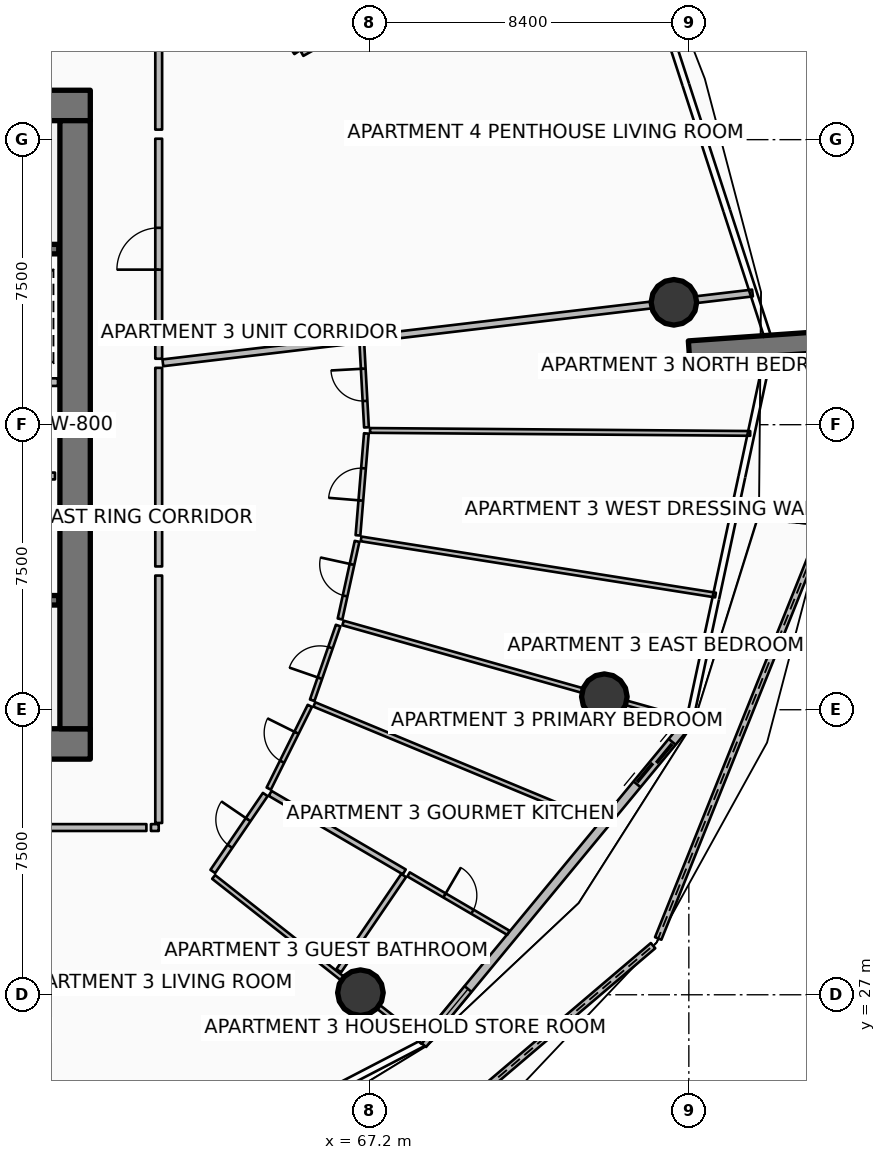
"""IFC4 building model, lengths in metres.
Left out: names, types, materials, properties, quantities, classifications, styles, units other than length and angle.
Written with IfcOpenShell. Run it as: python <this file> out.ifc"""

import sys

from ifc_helpers import new_model, si_unit, direction, frame, frame_2d, origin, origin_2d, place, context, subcontext, project, spatial, polyline, rectangle, circle, outline, extrude, element, fill, save


model = new_model("IFC4")
c1 = context("Model", 3, precision=1e-05, world=origin(), true_north=direction((0.0, 1.0)))
c2 = subcontext(c1, "Body", "Model", "MODEL_VIEW")
j1 = project(units=[si_unit("LENGTHUNIT", "METRE"), si_unit("PLANEANGLEUNIT", "RADIAN")], contexts=[c1])
p1 = place(None, origin())
s1 = spatial("IfcSite", under=j1, at=p1, CompositionType="ELEMENT")
p2 = place(p1, origin())
s2 = spatial("IfcBuilding", under=s1, at=p2, CompositionType="ELEMENT")
p3 = place(p2, frame((0.0, 0.0, 97.65)))
s3 = spatial("IfcBuildingStorey", under=s2, at=p3, CompositionType="ELEMENT", Elevation=97.65)
for number, where, z_axis, x_axis in (
    (1, (49.95, 33.6, 0.0), (0.0, 0.0, 1.0), (1.0, 0.0, 0.0)),
    (2, (49.95, 50.4, 0.0), (0.0, 0.0, 1.0), (1.0, 0.0, 0.0)),
):
    element("IfcWall", number, at=place(p3, frame(where, z_axis=z_axis, x_axis=x_axis)), inside=s3, PredefinedType="SHEAR", context=c2, shape_type="SweptSolid", body=[
        extrude(rectangle(XDim=9.9, YDim=0.8, at=frame_2d((4.95, 0.0))), origin(), (0.0, 0.0, 1.0), 3.75),
    ])
p4 = place(p3, frame((59.45, 34.0, 0.0), z_axis=(0.0, 0.0, 1.0), x_axis=(0.0, 1.0, 0.0)))
e3 = element("IfcWall", 3, at=p4, inside=s3, PredefinedType="SHEAR", context=c2, shape_type="SweptSolid", body=[
    extrude(rectangle(XDim=16.0, YDim=0.8, at=frame_2d((8.0, 0.0))), origin(), (0.0, 0.0, 1.0), 3.75),
])
p5 = place(p3, frame((75.606, 43.93, 0.0), z_axis=(0.0, 0.0, 1.0), x_axis=(0.997564163539, 0.069754853754, 0.0)))
e4 = element("IfcWall", 4, at=p5, inside=s3, PredefinedType="SOLIDWALL", context=c2, shape_type="SweptSolid", body=[
    extrude(rectangle(XDim=3.5, YDim=0.55, at=frame_2d((1.75, 0.0))), origin(), (0.0, 0.0, 1.0), 3.75),
])
for number, where, z_axis, x_axis in (
    (5, (66.958, 27.055, 0.0), (0.0, 0.0, 1.0), (1.0, 0.0, 0.0)),
    (6, (73.377, 34.843, 0.0), (0.0, 0.0, 1.0), (1.0, 0.0, 0.0)),
    (7, (75.207, 45.22, 0.0), (0.0, 0.0, 1.0), (1.0, 0.0, 0.0)),
):
    element("IfcColumn", number, at=place(p3, frame(where, z_axis=z_axis, x_axis=x_axis)), inside=s3, PredefinedType="COLUMN", context=c2, shape_type="SweptSolid", body=[
        extrude(circle(Radius=0.6, at=origin_2d()), origin(), (0.0, 0.0, 1.0), 3.5),
    ])
p6 = place(p3, frame((66.126, 21.038, 0.0), z_axis=(0.0, 0.0, 1.0), x_axis=(0.761849488871, 0.647754086291, 0.0)))
e8 = element("IfcWall", 8, at=p6, inside=s3, PredefinedType="PARAPET", context=c2, shape_type="SweptSolid", body=[
    extrude(outline(polyline([(0.0, 0.0), (11.2, 0.0), (11.2, 1.632), (5.6, 1.798), (0.0, 1.86), (0.0, 0.0)])), frame((0.0, 0.09, 0.0), z_axis=(0.0, -1.0, 0.0), x_axis=(1.0, 0.0, 0.0)), (0.0, 0.0, 1.0), 0.18),
])
p7 = place(p3, frame((74.794, 28.482, 0.0), z_axis=(0.0, 0.0, 1.0), x_axis=(0.372543477275, 0.928014739937, 0.0)))
e9 = element("IfcWall", 9, at=p7, inside=s3, PredefinedType="PARAPET", context=c2, shape_type="SweptSolid", body=[
    extrude(outline(polyline([(0.0, 0.0), (11.718, 0.0), (11.718, 1.233), (5.859, 1.418), (0.0, 1.632), (0.0, 0.0)])), frame((0.0, 0.09, 0.0), z_axis=(0.0, -1.0, 0.0), x_axis=(1.0, 0.0, 0.0)), (0.0, 0.0, 1.0), 0.18),
])
p8 = place(p3, frame((68.593, 25.702, 0.0), z_axis=(0.0, 0.0, 1.0), x_axis=(0.636704975, 0.771107498868, 0.0)))
e10 = element("IfcWall", 10, at=p8, inside=s3, PredefinedType="SOLIDWALL", context=c2, shape_type="SweptSolid", body=[
    extrude(rectangle(XDim=11.084, YDim=0.24, at=frame_2d((5.542, 0.0))), origin(), (0.0, 0.0, 1.0), 2.45),
])
p9 = place(p8, frame((8.864, 0.0, 0.0)))
e11 = element("IfcOpeningElement", 11, at=p9, cuts=e10, PredefinedType="OPENING", context=c2, shape_type="SweptSolid", body=[
    extrude(rectangle(XDim=1.45, YDim=2.15, at=frame_2d((0.725, 1.075))), frame((0.0, 0.13, 0.0), z_axis=(0.0, -1.0, 0.0), x_axis=(1.0, 0.0, 0.0)), (0.0, 0.0, 1.0), 0.26),
])
p10 = place(p8, frame((0.28, 0.0, 0.65)))
e12 = element("IfcOpeningElement", 12, at=p10, cuts=e10, PredefinedType="OPENING", context=c2, shape_type="SweptSolid", body=[
    extrude(rectangle(XDim=1.6, YDim=1.5, at=frame_2d((0.8, 0.75))), frame((0.0, 0.13, 0.0), z_axis=(0.0, -1.0, 0.0), x_axis=(1.0, 0.0, 0.0)), (0.0, 0.0, 1.0), 0.26),
])
p11 = place(p3, frame((51.48, 46.62, 0.0), z_axis=(0.0, 0.0, 1.0), x_axis=(1.0, 0.0, 0.0)))
e13 = element("IfcWall", 13, at=p11, inside=s3, PredefinedType="SOLIDWALL", context=c2, shape_type="SweptSolid", body=[
    extrude(rectangle(XDim=7.54, YDim=0.25, at=frame_2d((3.77, 0.0))), origin(), (0.0, 0.0, 1.0), 3.5),
])
p12 = place(p11, frame((0.3, 0.0, 0.0)))
e14 = element("IfcOpeningElement", 14, at=p12, cuts=e13, PredefinedType="OPENING", context=c2, shape_type="SweptSolid", body=[
    extrude(rectangle(XDim=1.55, YDim=2.15, at=frame_2d((0.775, 1.075))), frame((0.0, 0.135, 0.0), z_axis=(0.0, -1.0, 0.0), x_axis=(1.0, 0.0, 0.0)), (0.0, 0.0, 1.0), 0.27),
])
p13 = place(p3, frame((51.48, 37.38, 0.0), z_axis=(0.0, 0.0, 1.0), x_axis=(1.0, 0.0, 0.0)))
e15 = element("IfcWall", 15, at=p13, inside=s3, PredefinedType="SOLIDWALL", context=c2, shape_type="SweptSolid", body=[
    extrude(rectangle(XDim=7.54, YDim=0.25, at=frame_2d((3.77, 0.0))), origin(), (0.0, 0.0, 1.0), 3.5),
])
p14 = place(p13, frame((0.3, 0.0, 0.0)))
e16 = element("IfcOpeningElement", 16, at=p14, cuts=e15, PredefinedType="OPENING", context=c2, shape_type="SweptSolid", body=[
    extrude(rectangle(XDim=1.55, YDim=2.15, at=frame_2d((0.775, 1.075))), frame((0.0, 0.135, 0.0), z_axis=(0.0, -1.0, 0.0), x_axis=(1.0, 0.0, 0.0)), (0.0, 0.0, 1.0), 0.27),
])
p15 = place(p3, frame((52.42, 40.65, 0.0), z_axis=(0.0, 0.0, 1.0), x_axis=(1.0, 0.0, 0.0)))
e17 = element("IfcWall", 17, at=p15, inside=s3, PredefinedType="PARTITIONING", context=c2, shape_type="SweptSolid", body=[
    extrude(rectangle(XDim=6.5, YDim=0.18, at=frame_2d((3.25, 0.0))), origin(), (0.0, 0.0, 1.0), 3.5),
])
p16 = place(p15, frame((2.825, 0.0, 0.0)))
e18 = element("IfcOpeningElement", 18, at=p16, cuts=e17, PredefinedType="OPENING", context=c2, shape_type="SweptSolid", body=[
    extrude(rectangle(XDim=0.85, YDim=2.06, at=frame_2d((0.425, 1.03))), frame((0.0, 0.1, 0.0), z_axis=(0.0, -1.0, 0.0), x_axis=(1.0, 0.0, 0.0)), (0.0, 0.0, 1.0), 0.2),
])
p17 = place(p3, frame((50.12, 43.12, 0.0), z_axis=(0.0, 0.0, 1.0), x_axis=(1.0, 0.0, 0.0)))
e19 = element("IfcWall", 19, at=p17, inside=s3, PredefinedType="PARTITIONING", context=c2, shape_type="SweptSolid", body=[
    extrude(rectangle(XDim=8.88, YDim=0.2, at=frame_2d((4.44, 0.0))), origin(), (0.0, 0.0, 1.0), 3.5),
])
p18 = place(p3, frame((53.99, 31.304, 0.0), z_axis=(0.0, 0.0, 1.0), x_axis=(0.488628442553, -0.872491974249, 0.0)))
e20 = element("IfcWall", 20, at=p18, inside=s3, PredefinedType="PARTITIONING", context=c2, shape_type="SweptSolid", body=[
    extrude(rectangle(XDim=11.563, YDim=0.18, at=frame_2d((5.782, 0.0))), origin(), (0.0, 0.0, 1.0), 2.94),
])
p19 = place(p3, frame((61.759, 43.628, 0.0), z_axis=(0.0, 0.0, 1.0), x_axis=(0.99306822875, 0.117539325539, 0.0)))
e21 = element("IfcWall", 21, at=p19, inside=s3, PredefinedType="PARTITIONING", context=c2, shape_type="SweptSolid", body=[
    extrude(rectangle(XDim=15.624, YDim=0.18, at=frame_2d((7.812, 0.0))), origin(), (0.0, 0.0, 1.0), 2.94),
])
p20 = place(p3, frame((54.056, 31.4, 0.0), z_axis=(0.0, 0.0, 1.0), x_axis=(1.0, 0.0, 0.0)))
e22 = element("IfcWall", 22, at=p20, inside=s3, PredefinedType="PARTITIONING", context=c2, shape_type="SweptSolid", body=[
    extrude(rectangle(XDim=7.27, YDim=0.18, at=frame_2d((3.635, 0.0))), origin(), (0.0, 0.0, 1.0), 2.94),
])
p21 = place(p20, frame((3.085, 0.0, 0.0)))
e23 = element("IfcOpeningElement", 23, at=p21, cuts=e22, PredefinedType="OPENING", context=c2, shape_type="SweptSolid", body=[
    extrude(rectangle(XDim=1.1, YDim=2.1, at=frame_2d((0.55, 1.05))), frame((0.0, 0.1, 0.0), z_axis=(0.0, -1.0, 0.0), x_axis=(1.0, 0.0, 0.0)), (0.0, 0.0, 1.0), 0.2),
])
p22 = place(p3, frame((61.446, 31.4, 0.0), z_axis=(0.0, 0.0, 1.0), x_axis=(1.0, 0.0, 0.0)))
e24 = element("IfcWall", 24, at=p22, inside=s3, PredefinedType="PARTITIONING", context=c2, shape_type="SweptSolid", body=[
    extrude(rectangle(XDim=0.204, YDim=0.18, at=frame_2d((0.102, 0.0))), origin(), (0.0, 0.0, 1.0), 2.94),
])
p23 = place(p3, frame((61.65, 31.52, 0.0), z_axis=(0.0, 0.0, 1.0), x_axis=(0.0, 1.0, 0.0)))
e25 = element("IfcWall", 25, at=p23, inside=s3, PredefinedType="PARTITIONING", context=c2, shape_type="SweptSolid", body=[
    extrude(rectangle(XDim=6.51, YDim=0.18, at=frame_2d((3.255, 0.0))), origin(), (0.0, 0.0, 1.0), 2.94),
])
p24 = place(p3, frame((63.095, 30.1, 0.0), z_axis=(0.0, 0.0, 1.0), x_axis=(0.78530300145, -0.6191116183, 0.0)))
e26 = element("IfcWall", 26, at=p24, inside=s3, PredefinedType="PARTITIONING", context=c2, shape_type="SweptSolid", body=[
    extrude(rectangle(XDim=7.016, YDim=0.125, at=frame_2d((3.508, 0.0))), origin(), (0.0, 0.0, 1.0), 2.94),
])
p25 = place(p3, frame((63.073, 30.244, 0.0), z_axis=(0.0, 0.0, 1.0), x_axis=(0.563472809808, 0.826134609254, 0.0)))
e27 = element("IfcWall", 27, at=p25, inside=s3, PredefinedType="PARTITIONING", context=c2, shape_type="SweptSolid", body=[
    extrude(rectangle(XDim=2.451, YDim=0.15, at=frame_2d((1.226, 0.0))), origin(), (0.0, 0.0, 1.0), 2.94),
])
p26 = place(p25, frame((0.801, 0.0, 0.0)))
e28 = element("IfcOpeningElement", 28, at=p26, cuts=e27, PredefinedType="OPENING", context=c2, shape_type="SweptSolid", body=[
    extrude(rectangle(XDim=0.85, YDim=2.06, at=frame_2d((0.425, 1.03))), frame((0.0, 0.085, 0.0), z_axis=(0.0, -1.0, 0.0), x_axis=(1.0, 0.0, 0.0)), (0.0, 0.0, 1.0), 0.17),
])
p27 = place(p3, frame((66.387, 27.632, 0.0), z_axis=(0.0, 0.0, 1.0), x_axis=(0.563341818284, 0.826223938029, 0.0)))
e29 = element("IfcWall", 29, at=p27, inside=s3, PredefinedType="PARTITIONING", context=c2, shape_type="SweptSolid", body=[
    extrude(rectangle(XDim=3.034, YDim=0.15, at=frame_2d((1.517, 0.0))), origin(), (0.0, 0.0, 1.0), 2.94),
])
p28 = place(p3, frame((64.583, 32.298, 0.0), z_axis=(0.0, 0.0, 1.0), x_axis=(0.863128698129, -0.504984010109, 0.0)))
e30 = element("IfcWall", 30, at=p28, inside=s3, PredefinedType="PARTITIONING", context=c2, shape_type="SweptSolid", body=[
    extrude(rectangle(XDim=4.09, YDim=0.15, at=frame_2d((2.045, 0.0))), origin(), (0.0, 0.0, 1.0), 2.94),
])
p29 = place(p3, frame((68.225, 30.167, 0.0), z_axis=(0.0, 0.0, 1.0), x_axis=(0.863132180625, -0.504978057711, 0.0)))
e31 = element("IfcWall", 31, at=p29, inside=s3, PredefinedType="PARTITIONING", context=c2, shape_type="SweptSolid", body=[
    extrude(rectangle(XDim=3.043, YDim=0.125, at=frame_2d((1.521, 0.0))), origin(), (0.0, 0.0, 1.0), 2.94),
])
p30 = place(p29, frame((1.096, 0.0, 0.0)))
e32 = element("IfcOpeningElement", 32, at=p30, cuts=e31, PredefinedType="OPENING", context=c2, shape_type="SweptSolid", body=[
    extrude(rectangle(XDim=0.85, YDim=2.06, at=frame_2d((0.425, 1.03))), frame((0.0, 0.073, 0.0), z_axis=(0.0, -1.0, 0.0), x_axis=(1.0, 0.0, 0.0)), (0.0, 0.0, 1.0), 0.145),
])
p31 = place(p3, frame((65.746, 34.639, 0.0), z_axis=(0.0, 0.0, 1.0), x_axis=(0.923687629783, -0.383146398373, 0.0)))
e33 = element("IfcWall", 33, at=p31, inside=s3, PredefinedType="PARTITIONING", context=c2, shape_type="SweptSolid", body=[
    extrude(rectangle(XDim=8.122, YDim=0.125, at=frame_2d((4.061, 0.0))), origin(), (0.0, 0.0, 1.0), 2.94),
])
p32 = place(p3, frame((64.545, 32.424, 0.0), z_axis=(0.0, 0.0, 1.0), x_axis=(0.445043296976, 0.895509052895, 0.0)))
e34 = element("IfcWall", 34, at=p32, inside=s3, PredefinedType="PARTITIONING", context=c2, shape_type="SweptSolid", body=[
    extrude(rectangle(XDim=2.431, YDim=0.125, at=frame_2d((1.216, 0.0))), origin(), (0.0, 0.0, 1.0), 2.94),
])
p33 = place(p32, frame((0.791, 0.0, 0.0)))
e35 = element("IfcOpeningElement", 35, at=p33, cuts=e34, PredefinedType="OPENING", context=c2, shape_type="SweptSolid", body=[
    extrude(rectangle(XDim=0.85, YDim=2.06, at=frame_2d((0.425, 1.03))), frame((0.0, 0.073, 0.0), z_axis=(0.0, -1.0, 0.0), x_axis=(1.0, 0.0, 0.0)), (0.0, 0.0, 1.0), 0.145),
])
p34 = place(p3, frame((65.689, 34.749, 0.0), z_axis=(0.0, 0.0, 1.0), x_axis=(0.327956443315, 0.944692844944, 0.0)))
e36 = element("IfcWall", 36, at=p34, inside=s3, PredefinedType="PARTITIONING", context=c2, shape_type="SweptSolid", body=[
    extrude(rectangle(XDim=2.082, YDim=0.125, at=frame_2d((1.041, 0.0))), origin(), (0.0, 0.0, 1.0), 2.94),
])
p35 = place(p34, frame((0.615, 0.0, 0.0)))
e37 = element("IfcOpeningElement", 37, at=p35, cuts=e36, PredefinedType="OPENING", context=c2, shape_type="SweptSolid", body=[
    extrude(rectangle(XDim=0.85, YDim=2.06, at=frame_2d((0.425, 1.03))), frame((0.0, 0.073, 0.0), z_axis=(0.0, -1.0, 0.0), x_axis=(1.0, 0.0, 0.0)), (0.0, 0.0, 1.0), 0.145),
])
p36 = place(p3, frame((61.65, 38.27, 0.0), z_axis=(0.0, 0.0, 1.0), x_axis=(0.0, 1.0, 0.0)))
e38 = element("IfcWall", 38, at=p36, inside=s3, PredefinedType="PARTITIONING", context=c2, shape_type="SweptSolid", body=[
    extrude(rectangle(XDim=5.225, YDim=0.18, at=frame_2d((2.613, 0.0))), origin(), (0.0, 0.0, 1.0), 2.94),
])
p37 = place(p3, frame((66.5, 36.782, 0.0), z_axis=(0.0, 0.0, 1.0), x_axis=(0.962451600307, -0.271453342338, 0.0)))
e39 = element("IfcWall", 39, at=p37, inside=s3, PredefinedType="PARTITIONING", context=c2, shape_type="SweptSolid", body=[
    extrude(rectangle(XDim=9.349, YDim=0.125, at=frame_2d((4.675, 0.0))), origin(), (0.0, 0.0, 1.0), 2.94),
])
p38 = place(p3, frame((66.976, 38.995, 0.0), z_axis=(0.0, 0.0, 1.0), x_axis=(0.987686752204, -0.156444493419, 0.0)))
e40 = element("IfcWall", 40, at=p38, inside=s3, PredefinedType="PARTITIONING", context=c2, shape_type="SweptSolid", body=[
    extrude(rectangle(XDim=9.443, YDim=0.125, at=frame_2d((4.721, 0.0))), origin(), (0.0, 0.0, 1.0), 2.94),
])
p39 = place(p3, frame((67.211, 41.849, 0.0), z_axis=(0.0, 0.0, 1.0), x_axis=(0.999969120795, -0.007858591192, 0.0)))
e41 = element("IfcWall", 41, at=p39, inside=s3, PredefinedType="PARTITIONING", context=c2, shape_type="SweptSolid", body=[
    extrude(rectangle(XDim=10.003, YDim=0.125, at=frame_2d((5.002, 0.0))), origin(), (0.0, 0.0, 1.0), 2.94),
])
p40 = place(p3, frame((66.421, 36.888, 0.0), z_axis=(0.0, 0.0, 1.0), x_axis=(0.21430951395, 0.97676580214, 0.0)))
e42 = element("IfcWall", 42, at=p40, inside=s3, PredefinedType="PARTITIONING", context=c2, shape_type="SweptSolid", body=[
    extrude(rectangle(XDim=2.092, YDim=0.125, at=frame_2d((1.046, 0.0))), origin(), (0.0, 0.0, 1.0), 2.94),
])
p41 = place(p40, frame((0.621, 0.0, 0.0)))
e43 = element("IfcOpeningElement", 43, at=p41, cuts=e42, PredefinedType="OPENING", context=c2, shape_type="SweptSolid", body=[
    extrude(rectangle(XDim=0.85, YDim=2.06, at=frame_2d((0.425, 1.03))), frame((0.0, 0.073, 0.0), z_axis=(0.0, -1.0, 0.0), x_axis=(1.0, 0.0, 0.0)), (0.0, 0.0, 1.0), 0.145),
])
p42 = place(p3, frame((66.893, 39.088, 0.0), z_axis=(0.0, 0.0, 1.0), x_axis=(0.082294564914, 0.996608049629, 0.0)))
e44 = element("IfcWall", 44, at=p42, inside=s3, PredefinedType="PARTITIONING", context=c2, shape_type="SweptSolid", body=[
    extrude(rectangle(XDim=2.691, YDim=0.125, at=frame_2d((1.345, 0.0))), origin(), (0.0, 0.0, 1.0), 2.94),
])
p43 = place(p42, frame((0.92, 0.0, 0.0)))
e45 = element("IfcOpeningElement", 45, at=p43, cuts=e44, PredefinedType="OPENING", context=c2, shape_type="SweptSolid", body=[
    extrude(rectangle(XDim=0.85, YDim=2.06, at=frame_2d((0.425, 1.03))), frame((0.0, 0.073, 0.0), z_axis=(0.0, -1.0, 0.0), x_axis=(1.0, 0.0, 0.0)), (0.0, 0.0, 1.0), 0.145),
])
p44 = place(p3, frame((67.117, 41.93, 0.0), z_axis=(0.0, 0.0, 1.0), x_axis=(-0.054896910866, 0.998492027598, 0.0)))
e46 = element("IfcWall", 46, at=p44, inside=s3, PredefinedType="PARTITIONING", context=c2, shape_type="SweptSolid", body=[
    extrude(rectangle(XDim=2.241, YDim=0.125, at=frame_2d((1.121, 0.0))), origin(), (0.0, 0.0, 1.0), 2.94),
])
p45 = place(p44, frame((0.696, 0.0, 0.0)))
e47 = element("IfcOpeningElement", 47, at=p45, cuts=e46, PredefinedType="OPENING", context=c2, shape_type="SweptSolid", body=[
    extrude(rectangle(XDim=0.85, YDim=2.06, at=frame_2d((0.425, 1.03))), frame((0.0, 0.073, 0.0), z_axis=(0.0, -1.0, 0.0), x_axis=(1.0, 0.0, 0.0)), (0.0, 0.0, 1.0), 0.145),
])
p46 = place(p3, frame((61.65, 43.736, 0.0), z_axis=(0.0, 0.0, 1.0), x_axis=(0.0, 1.0, 0.0)))
e48 = element("IfcWall", 48, at=p46, inside=s3, PredefinedType="PARTITIONING", context=c2, shape_type="SweptSolid", body=[
    extrude(rectangle(XDim=5.789, YDim=0.18, at=frame_2d((2.895, 0.0))), origin(), (0.0, 0.0, 1.0), 2.94),
])
p47 = place(p46, frame((2.344, 0.0, 0.0)))
e49 = element("IfcOpeningElement", 49, at=p47, cuts=e48, PredefinedType="OPENING", context=c2, shape_type="SweptSolid", body=[
    extrude(rectangle(XDim=1.1, YDim=2.1, at=frame_2d((0.55, 1.05))), frame((0.0, 0.1, 0.0), z_axis=(0.0, -1.0, 0.0), x_axis=(1.0, 0.0, 0.0)), (0.0, 0.0, 1.0), 0.2),
])
p48 = place(p3, frame((61.65, 49.764, 0.0), z_axis=(0.0, 0.0, 1.0), x_axis=(0.0, 1.0, 0.0)))
e50 = element("IfcWall", 50, at=p48, inside=s3, PredefinedType="PARTITIONING", context=c2, shape_type="SweptSolid", body=[
    extrude(rectangle(XDim=2.716, YDim=0.18, at=frame_2d((1.358, 0.0))), origin(), (0.0, 0.0, 1.0), 2.94),
])
p49 = place(p3, frame((65.425, 51.759, 0.0), z_axis=(0.0, 0.0, 1.0), x_axis=(0.872502512898, 0.488609624328, 0.0)))
e51 = element("IfcWall", 51, at=p49, inside=s3, PredefinedType="PARTITIONING", context=c2, shape_type="SweptSolid", body=[
    extrude(rectangle(XDim=9.508, YDim=0.125, at=frame_2d((4.754, 0.0))), origin(), (0.0, 0.0, 1.0), 2.94),
])
p50 = place(p3, frame((65.283, 51.793, 0.0), z_axis=(0.0, 0.0, 1.0), x_axis=(-0.55052065121, 0.834821545357, 0.0)))
e52 = element("IfcWall", 52, at=p50, inside=s3, PredefinedType="PARTITIONING", context=c2, shape_type="SweptSolid", body=[
    extrude(rectangle(XDim=2.687, YDim=0.15, at=frame_2d((1.344, 0.0))), origin(), (0.0, 0.0, 1.0), 2.94),
])
p51 = place(p50, frame((0.918, 0.0, 0.0)))
e53 = element("IfcOpeningElement", 53, at=p51, cuts=e52, PredefinedType="OPENING", context=c2, shape_type="SweptSolid", body=[
    extrude(rectangle(XDim=0.85, YDim=2.06, at=frame_2d((0.425, 1.03))), frame((0.0, 0.085, 0.0), z_axis=(0.0, -1.0, 0.0), x_axis=(1.0, 0.0, 0.0)), (0.0, 0.0, 1.0), 0.17),
])
p52 = place(p9, origin())
e54 = element("IfcDoor", 54, at=p52, inside=s3, OperationType="DOUBLE_DOOR_SLIDING", PredefinedType="DOOR", context=c2, shape_type="SweptSolid", body=[
    extrude(rectangle(XDim=1.45, YDim=2.15, at=frame_2d((0.725, 1.075))), frame((0.0, 0.025, 0.0), z_axis=(0.0, -1.0, 0.0), x_axis=(1.0, 0.0, 0.0)), (0.0, 0.0, 1.0), 0.05),
])
fill(e11, e54)
p53 = place(p10, origin())
e55 = element("IfcWindow", 55, at=p53, inside=s3, PartitioningType="SINGLE_PANEL", PredefinedType="WINDOW", context=c2, shape_type="SweptSolid", body=[
    extrude(rectangle(XDim=1.6, YDim=1.5, at=frame_2d((0.8, 0.75))), frame((0.0, 0.03, 0.0), z_axis=(0.0, -1.0, 0.0), x_axis=(1.0, 0.0, 0.0)), (0.0, 0.0, 1.0), 0.06),
])
fill(e12, e55)
p54 = place(p26, origin())
e56 = element("IfcDoor", 56, at=p54, inside=s3, OperationType="SINGLE_SWING_RIGHT", PredefinedType="DOOR", context=c2, shape_type="SweptSolid", body=[
    extrude(rectangle(XDim=0.85, YDim=2.06, at=frame_2d((0.425, 1.03))), frame((0.0, 0.025, 0.0), z_axis=(0.0, -1.0, 0.0), x_axis=(1.0, 0.0, 0.0)), (0.0, 0.0, 1.0), 0.05),
])
fill(e28, e56)
p55 = place(p30, origin())
e57 = element("IfcDoor", 57, at=p55, inside=s3, OperationType="SINGLE_SWING_LEFT", PredefinedType="DOOR", context=c2, shape_type="SweptSolid", body=[
    extrude(rectangle(XDim=0.85, YDim=2.06, at=frame_2d((0.425, 1.03))), frame((0.0, 0.025, 0.0), z_axis=(0.0, -1.0, 0.0), x_axis=(1.0, 0.0, 0.0)), (0.0, 0.0, 1.0), 0.05),
])
fill(e32, e57)
p56 = place(p33, origin())
e58 = element("IfcDoor", 58, at=p56, inside=s3, OperationType="SINGLE_SWING_RIGHT", PredefinedType="DOOR", context=c2, shape_type="SweptSolid", body=[
    extrude(rectangle(XDim=0.85, YDim=2.06, at=frame_2d((0.425, 1.03))), frame((0.0, 0.025, 0.0), z_axis=(0.0, -1.0, 0.0), x_axis=(1.0, 0.0, 0.0)), (0.0, 0.0, 1.0), 0.05),
])
fill(e35, e58)
p57 = place(p35, origin())
e59 = element("IfcDoor", 59, at=p57, inside=s3, OperationType="SINGLE_SWING_LEFT", PredefinedType="DOOR", context=c2, shape_type="SweptSolid", body=[
    extrude(rectangle(XDim=0.85, YDim=2.06, at=frame_2d((0.425, 1.03))), frame((0.0, 0.025, 0.0), z_axis=(0.0, -1.0, 0.0), x_axis=(1.0, 0.0, 0.0)), (0.0, 0.0, 1.0), 0.05),
])
fill(e37, e59)
p58 = place(p41, origin())
e60 = element("IfcDoor", 60, at=p58, inside=s3, OperationType="SINGLE_SWING_RIGHT", PredefinedType="DOOR", context=c2, shape_type="SweptSolid", body=[
    extrude(rectangle(XDim=0.85, YDim=2.06, at=frame_2d((0.425, 1.03))), frame((0.0, 0.025, 0.0), z_axis=(0.0, -1.0, 0.0), x_axis=(1.0, 0.0, 0.0)), (0.0, 0.0, 1.0), 0.05),
])
fill(e43, e60)
p59 = place(p43, origin())
e61 = element("IfcDoor", 61, at=p59, inside=s3, OperationType="SINGLE_SWING_LEFT", PredefinedType="DOOR", context=c2, shape_type="SweptSolid", body=[
    extrude(rectangle(XDim=0.85, YDim=2.06, at=frame_2d((0.425, 1.03))), frame((0.0, 0.025, 0.0), z_axis=(0.0, -1.0, 0.0), x_axis=(1.0, 0.0, 0.0)), (0.0, 0.0, 1.0), 0.05),
])
fill(e45, e61)
p60 = place(p45, origin())
e62 = element("IfcDoor", 62, at=p60, inside=s3, OperationType="SINGLE_SWING_RIGHT", PredefinedType="DOOR", context=c2, shape_type="SweptSolid", body=[
    extrude(rectangle(XDim=0.85, YDim=2.06, at=frame_2d((0.425, 1.03))), frame((0.0, 0.025, 0.0), z_axis=(0.0, -1.0, 0.0), x_axis=(1.0, 0.0, 0.0)), (0.0, 0.0, 1.0), 0.05),
])
fill(e47, e62)
p61 = place(p47, origin())
e63 = element("IfcDoor", 63, at=p61, inside=s3, OperationType="SINGLE_SWING_LEFT", PredefinedType="DOOR", context=c2, shape_type="SweptSolid", body=[
    extrude(rectangle(XDim=1.1, YDim=2.1, at=frame_2d((0.55, 1.05))), frame((0.0, 0.025, 0.0), z_axis=(0.0, -1.0, 0.0), x_axis=(1.0, 0.0, 0.0)), (0.0, 0.0, 1.0), 0.05),
])
fill(e49, e63)
save(model, sys.argv[1])
